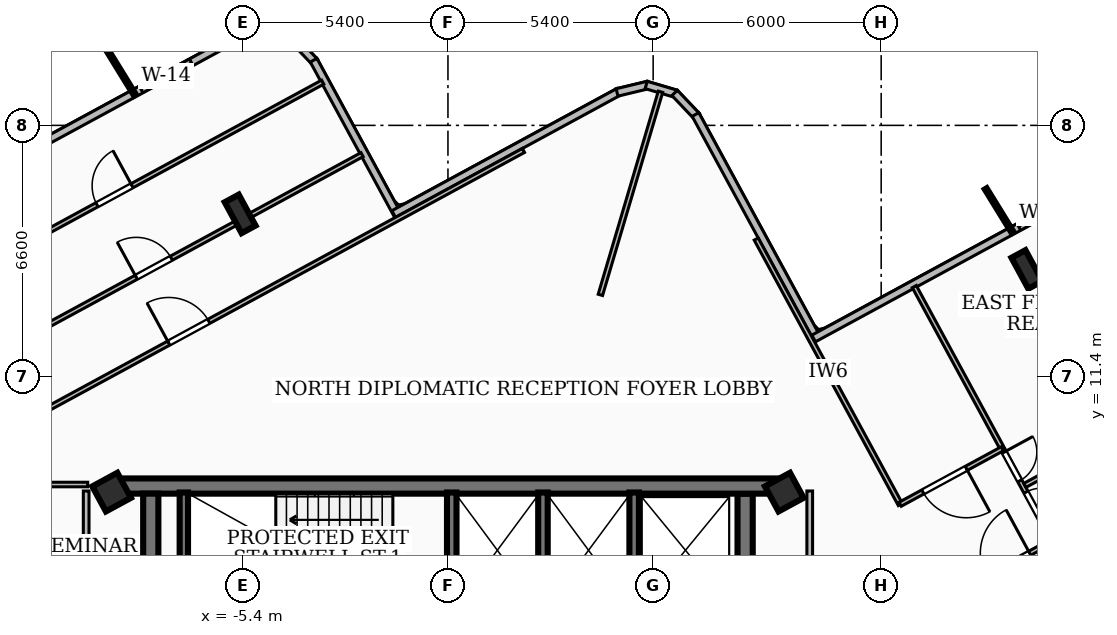
"""IFC4 building model, lengths in metres.
Left out: names, types, materials, properties, quantities, classifications, styles, units other than length and angle.
Written with IfcOpenShell. Run it as: python <this file> out.ifc"""

import sys

from ifc_helpers import new_model, si_unit, direction, frame, frame_2d, origin, origin_2d, place, context, subcontext, project, spatial, rectangle, i_section, extrude, element, fill, save


model = new_model("IFC4")
c1 = context("Model", 3, precision=1e-05, world=origin(), true_north=direction((0.0, 1.0)))
c2 = subcontext(c1, "Body", "Model", "MODEL_VIEW")
j1 = project(units=[si_unit("LENGTHUNIT", "METRE"), si_unit("PLANEANGLEUNIT", "RADIAN")], contexts=[c1])
p1 = place(None, origin())
s1 = spatial("IfcSite", under=j1, at=p1, CompositionType="ELEMENT")
p2 = place(p1, origin())
s2 = spatial("IfcBuilding", under=s1, at=p2, CompositionType="ELEMENT")
p3 = place(p2, frame((0.0, 0.0, 200.88)))
s3 = spatial("IfcBuildingStorey", under=s2, at=p3, CompositionType="ELEMENT", Elevation=200.88)
p4 = place(p3, frame((-8.78, 8.51, 0.0), z_axis=(0.0, 0.0, 1.0), x_axis=(1.0, 0.0, 0.0)))
e1 = element("IfcWall", 1, at=p4, inside=s3, PredefinedType="SHEAR", context=c2, shape_type="SweptSolid", body=[
    extrude(rectangle(XDim=17.56, YDim=0.4, at=frame_2d((8.78, 0.0))), origin(), (0.0, 0.0, 1.0), 4.06),
])
for number, where, z_axis, x_axis in (
    (2, (-7.82, 1.95, 0.0), (0.0, 0.0, 1.0), (0.0, 1.0, 0.0)),
    (3, (7.82, 8.31, 0.0), (0.0, 0.0, 1.0), (0.0, -1.0, 0.0)),
):
    element("IfcWall", number, at=place(p3, frame(where, z_axis=z_axis, x_axis=x_axis)), inside=s3, PredefinedType="SHEAR", context=c2, shape_type="SweptSolid", body=[
        extrude(rectangle(XDim=6.36, YDim=0.4, at=frame_2d((3.18, 0.0))), origin(), (0.0, 0.0, 1.0), 4.06),
    ])
p5 = place(p3, frame((-6.95, 5.28, 0.0), z_axis=(0.0, 0.0, 1.0), x_axis=(0.0, 1.0, 0.0)))
e4 = element("IfcWall", 4, at=p5, inside=s3, PredefinedType="SOLIDWALL", context=c2, shape_type="SweptSolid", body=[
    extrude(rectangle(XDim=3.06, YDim=0.22, at=frame_2d((1.53, 0.0))), origin(), (0.0, 0.0, 1.0), 4.06),
])
for number, where, z_axis, x_axis in (
    (5, (0.1, 5.3, 0.0), (0.0, 0.0, 1.0), (0.0, 1.0, 0.0)),
    (6, (2.5, 5.3, 0.0), (0.0, 0.0, 1.0), (0.0, 1.0, 0.0)),
    (7, (4.9, 5.3, 0.0), (0.0, 0.0, 1.0), (0.0, 1.0, 0.0)),
):
    element("IfcWall", number, at=place(p3, frame(where, z_axis=z_axis, x_axis=x_axis)), inside=s3, PredefinedType="SOLIDWALL", context=c2, shape_type="SweptSolid", body=[
        extrude(rectangle(XDim=3.04, YDim=0.25, at=frame_2d((1.52, 0.0))), origin(), (0.0, 0.0, 1.0), 4.06),
    ])
for number, where, z_axis, x_axis in (
    (8, (-8.85, 8.35, 0.0), (0.0, 0.0, 1.0), (0.879, 0.477, 0.0)),
    (9, (8.85, 8.35, 0.0), (0.0, 0.0, 1.0), (0.879, 0.477, 0.0)),
):
    element("IfcColumn", number, at=place(p3, frame(where, z_axis=z_axis, x_axis=x_axis)), inside=s3, PredefinedType="COLUMN", context=c2, shape_type="SweptSolid", body=[
        extrude(rectangle(XDim=0.75, YDim=0.75, at=origin_2d()), origin(), (0.0, 0.0, 1.0), 4.32),
    ])
for number, where, z_axis, x_axis in (
    (10, (15.234, 14.209, 0.0), (0.0, 0.0, 1.0), (0.879, 0.477, 0.0)),
    (11, (-5.468, 15.671, 0.0), (0.0, 0.0, 1.0), (0.879, 0.477, 0.0)),
):
    element("IfcColumn", number, at=place(p3, frame(where, z_axis=z_axis, x_axis=x_axis)), inside=s3, PredefinedType="COLUMN", context=c2, shape_type="SweptSolid", body=[
        extrude(i_section(OverallWidth=0.418, OverallDepth=0.927, WebThickness=0.019, FlangeThickness=0.032, at=origin_2d()), origin(), (0.0, 0.0, 1.0), 4.32),
    ])
p6 = place(p3, frame((-14.011, 15.72, 0.0), z_axis=(0.0, 0.0, 1.0), x_axis=(0.878829422659, 0.477136087368, 0.0)))
e12 = element("IfcWall", 12, at=p6, inside=s3, PredefinedType="SOLIDWALL", context=c2, shape_type="SweptSolid", body=[
    extrude(rectangle(XDim=9.624, YDim=0.2, at=frame_2d((4.812, 0.0))), origin(), (0.0, 0.0, 1.0), 4.06),
])
p7 = place(p6, frame((6.757, 0.0, 0.85)))
e13 = element("IfcOpeningElement", 13, at=p7, cuts=e12, PredefinedType="OPENING", context=c2, shape_type="SweptSolid", body=[
    extrude(rectangle(XDim=1.5, YDim=1.5, at=frame_2d((0.75, 0.75))), frame((0.0, 0.11, 0.0), z_axis=(0.0, -1.0, 0.0), x_axis=(1.0, 0.0, 0.0)), (0.0, 0.0, 1.0), 0.22),
])
p8 = place(p3, frame((-4.083, 20.282, 0.0), z_axis=(0.0, 0.0, 1.0), x_axis=(0.688366566384, -0.725362992084, 0.0)))
e14 = element("IfcWall", 14, at=p8, inside=s3, PredefinedType="SOLIDWALL", context=c2, shape_type="SweptSolid", body=[
    extrude(rectangle(XDim=0.838, YDim=0.2, at=frame_2d((0.419, 0.0))), origin(), (0.0, 0.0, 1.0), 4.06),
])
p9 = place(p3, frame((-3.535, 19.714, 0.0), z_axis=(0.0, 0.0, 1.0), x_axis=(0.477170791431, -0.878810580162, 0.0)))
e15 = element("IfcWall", 15, at=p9, inside=s3, PredefinedType="SOLIDWALL", context=c2, shape_type="SweptSolid", body=[
    extrude(rectangle(XDim=4.642, YDim=0.2, at=frame_2d((2.321, 0.0))), origin(), (0.0, 0.0, 1.0), 4.06),
])
p10 = place(p3, frame((-1.428, 15.667, 0.0), z_axis=(0.0, 0.0, 1.0), x_axis=(0.878784004338, 0.477219733162, 0.0)))
e16 = element("IfcWall", 16, at=p10, inside=s3, PredefinedType="SOLIDWALL", context=c2, shape_type="SweptSolid", body=[
    extrude(rectangle(XDim=6.741, YDim=0.2, at=frame_2d((3.371, 0.0))), origin(), (0.0, 0.0, 1.0), 4.06),
])
p11 = place(p3, frame((4.45, 18.866, 0.0), z_axis=(0.0, 0.0, 1.0), x_axis=(0.972262900219, 0.233890685703, 0.0)))
e17 = element("IfcWall", 17, at=p11, inside=s3, PredefinedType="SOLIDWALL", context=c2, shape_type="SweptSolid", body=[
    extrude(rectangle(XDim=0.838, YDim=0.2, at=frame_2d((0.419, 0.0))), origin(), (0.0, 0.0, 1.0), 4.06),
])
p12 = place(p3, frame((5.217, 19.063, 0.0), z_axis=(0.0, 0.0, 1.0), x_axis=(0.958863850972, -0.283866368736, 0.0)))
e18 = element("IfcWall", 18, at=p12, inside=s3, PredefinedType="SOLIDWALL", context=c2, shape_type="SweptSolid", body=[
    extrude(rectangle(XDim=0.824, YDim=0.2, at=frame_2d((0.412, 0.0))), origin(), (0.0, 0.0, 1.0), 4.06),
])
p13 = place(p3, frame((5.966, 18.854, 0.0), z_axis=(0.0, 0.0, 1.0), x_axis=(0.688366566384, -0.725362992084, 0.0)))
e19 = element("IfcWall", 19, at=p13, inside=s3, PredefinedType="SOLIDWALL", context=c2, shape_type="SweptSolid", body=[
    extrude(rectangle(XDim=0.838, YDim=0.2, at=frame_2d((0.419, 0.0))), origin(), (0.0, 0.0, 1.0), 4.06),
])
p14 = place(p3, frame((6.514, 18.286, 0.0), z_axis=(0.0, 0.0, 1.0), x_axis=(0.477174172682, -0.878808744224, 0.0)))
e20 = element("IfcWall", 20, at=p14, inside=s3, PredefinedType="SOLIDWALL", context=c2, shape_type="SweptSolid", body=[
    extrude(rectangle(XDim=6.742, YDim=0.2, at=frame_2d((3.371, 0.0))), origin(), (0.0, 0.0, 1.0), 4.06),
])
p15 = place(p3, frame((9.623, 12.393, 0.0), z_axis=(0.0, 0.0, 1.0), x_axis=(0.878806785067, 0.477177780832, 0.0)))
e21 = element("IfcWall", 21, at=p15, inside=s3, PredefinedType="SOLIDWALL", context=c2, shape_type="SweptSolid", body=[
    extrude(rectangle(XDim=8.842, YDim=0.2, at=frame_2d((4.421, 0.0))), origin(), (0.0, 0.0, 1.0), 4.06),
])
p16 = place(p15, frame((6.146, 0.0, 0.85)))
e22 = element("IfcOpeningElement", 22, at=p16, cuts=e21, PredefinedType="OPENING", context=c2, shape_type="SweptSolid", body=[
    extrude(rectangle(XDim=1.5, YDim=1.5, at=frame_2d((0.75, 0.75))), frame((0.0, 0.11, 0.0), z_axis=(0.0, -1.0, 0.0), x_axis=(1.0, 0.0, 0.0)), (0.0, 0.0, 1.0), 0.22),
])
p17 = place(p3, frame((-9.52, 1.75, 0.0), z_axis=(0.0, 0.0, 1.0), x_axis=(0.0, 1.0, 0.0)))
e23 = element("IfcWall", 23, at=p17, inside=s3, PredefinedType="PARTITIONING", context=c2, shape_type="SweptSolid", body=[
    extrude(rectangle(XDim=6.63, YDim=0.15, at=frame_2d((3.315, 0.0))), origin(), (0.0, 0.0, 1.0), 4.06),
])
p18 = place(p3, frame((9.52, 1.75, 0.0), z_axis=(0.0, 0.0, 1.0), x_axis=(0.0, 1.0, 0.0)))
e24 = element("IfcWall", 24, at=p18, inside=s3, PredefinedType="PARTITIONING", context=c2, shape_type="SweptSolid", body=[
    extrude(rectangle(XDim=6.63, YDim=0.15, at=frame_2d((3.315, 0.0))), origin(), (0.0, 0.0, 1.0), 3.43),
])
p19 = place(p3, frame((-14.4, 8.55, 0.0), z_axis=(0.0, 0.0, 1.0), x_axis=(1.0, 0.0, 0.0)))
e25 = element("IfcWall", 25, at=p19, inside=s3, PredefinedType="PARTITIONING", context=c2, shape_type="SweptSolid", body=[
    extrude(rectangle(XDim=4.92, YDim=0.12, at=frame_2d((2.46, 0.0))), origin(), (0.0, 0.0, 1.0), 3.43),
])
p20 = place(p3, frame((4.011, 13.54, 0.0), z_axis=(0.0, 0.0, 1.0), x_axis=(0.283861614282, 0.958865258489, 0.0)))
e26 = element("IfcWall", 26, at=p20, inside=s3, PredefinedType="PARTITIONING", context=c2, shape_type="SweptSolid", body=[
    extrude(rectangle(XDim=5.573, YDim=0.12, at=frame_2d((2.787, 0.0))), origin(), (0.0, 0.0, 1.0), 4.06),
])
p21 = place(p3, frame((11.905, 8.023, 0.0), z_axis=(0.0, 0.0, 1.0), x_axis=(-0.477237565532, 0.878774320315, 0.0)))
e27 = element("IfcWall", 27, at=p21, inside=s3, PredefinedType="PARTITIONING", context=c2, shape_type="SweptSolid", body=[
    extrude(rectangle(XDim=7.95, YDim=0.12, at=frame_2d((3.975, 0.0))), origin(), (0.0, 0.0, 1.0), 3.43),
])
p22 = place(p3, frame((14.589, 9.491, 0.0), z_axis=(0.0, 0.0, 1.0), x_axis=(-0.878839093996, -0.477118273454, 0.0)))
e28 = element("IfcWall", 28, at=p22, inside=s3, PredefinedType="PARTITIONING", context=c2, shape_type="SweptSolid", body=[
    extrude(rectangle(XDim=3.06, YDim=0.12, at=frame_2d((1.53, 0.0))), origin(), (0.0, 0.0, 1.0), 3.43),
])
p23 = place(p22, frame((1.08, 0.0, 0.0)))
e29 = element("IfcOpeningElement", 29, at=p23, cuts=e28, PredefinedType="OPENING", context=c2, shape_type="SweptSolid", body=[
    extrude(rectangle(XDim=1.3, YDim=2.1, at=frame_2d((0.65, 1.05))), frame((0.0, 0.07, 0.0), z_axis=(0.0, -1.0, 0.0), x_axis=(1.0, 0.0, 0.0)), (0.0, 0.0, 1.0), 0.14),
])
p24 = place(p3, frame((13.217, 5.606, 0.0), z_axis=(0.0, 0.0, 1.0), x_axis=(0.87882092953, 0.477151730397, 0.0)))
e30 = element("IfcWall", 30, at=p24, inside=s3, PredefinedType="PARTITIONING", context=c2, shape_type="SweptSolid", body=[
    extrude(rectangle(XDim=3.06, YDim=0.12, at=frame_2d((1.53, 0.0))), origin(), (0.0, 0.0, 1.0), 4.06),
])
p25 = place(p24, frame((1.08, 0.0, 0.0)))
e31 = element("IfcOpeningElement", 31, at=p25, cuts=e30, PredefinedType="OPENING", context=c2, shape_type="SweptSolid", body=[
    extrude(rectangle(XDim=1.3, YDim=2.1, at=frame_2d((0.65, 1.05))), frame((0.0, 0.07, 0.0), z_axis=(0.0, -1.0, 0.0), x_axis=(1.0, 0.0, 0.0)), (0.0, 0.0, 1.0), 0.14),
])
p26 = place(p3, frame((15.181, 8.527, 0.0), z_axis=(0.0, 0.0, 1.0), x_axis=(0.878776100726, 0.477234287109, 0.0)))
e32 = element("IfcWall", 32, at=p26, inside=s3, PredefinedType="PARTITIONING", context=c2, shape_type="SweptSolid", body=[
    extrude(rectangle(XDim=7.225, YDim=0.12, at=frame_2d((3.612, 0.0))), origin(), (0.0, 0.0, 1.0), 3.43),
])
p27 = place(p3, frame((12.272, 13.758, 0.0), z_axis=(0.0, 0.0, 1.0), x_axis=(0.477201164774, -0.878794087564, 0.0)))
e33 = element("IfcWall", 33, at=p27, inside=s3, PredefinedType="PARTITIONING", context=c2, shape_type="SweptSolid", body=[
    extrude(rectangle(XDim=12.47, YDim=0.12, at=frame_2d((6.235, 0.0))), origin(), (0.0, 0.0, 1.0), 3.43),
])
p28 = place(p27, frame((6.155, 0.0, 0.0)))
e34 = element("IfcOpeningElement", 34, at=p28, cuts=e33, PredefinedType="OPENING", context=c2, shape_type="SweptSolid", body=[
    extrude(rectangle(XDim=0.86, YDim=2.04, at=frame_2d((0.43, 1.02))), frame((0.0, 0.07, 0.0), z_axis=(0.0, -1.0, 0.0), x_axis=(1.0, 0.0, 0.0)), (0.0, 0.0, 1.0), 0.14),
])
p29 = place(p27, frame((4.955, 0.0, 0.0)))
e35 = element("IfcOpeningElement", 35, at=p29, cuts=e33, PredefinedType="OPENING", context=c2, shape_type="SweptSolid", body=[
    extrude(rectangle(XDim=0.86, YDim=2.04, at=frame_2d((0.43, 1.02))), frame((0.0, 0.07, 0.0), z_axis=(0.0, -1.0, 0.0), x_axis=(1.0, 0.0, 0.0)), (0.0, 0.0, 1.0), 0.14),
])
p30 = place(p3, frame((-15.624, 7.777, 0.0), z_axis=(0.0, 0.0, 1.0), x_axis=(0.878797236248, 0.477195366242, 0.0)))
e36 = element("IfcWall", 36, at=p30, inside=s3, PredefinedType="PARTITIONING", context=c2, shape_type="SweptSolid", body=[
    extrude(rectangle(XDim=20.04, YDim=0.12, at=frame_2d((10.02, 0.0))), origin(), (0.0, 0.0, 1.0), 3.43),
])
p31 = place(p30, frame((9.419, 0.0, 0.0)))
e37 = element("IfcOpeningElement", 37, at=p31, cuts=e36, PredefinedType="OPENING", context=c2, shape_type="SweptSolid", body=[
    extrude(rectangle(XDim=1.2, YDim=2.1, at=frame_2d((0.6, 1.05))), frame((0.0, 0.07, 0.0), z_axis=(0.0, -1.0, 0.0), x_axis=(1.0, 0.0, 0.0)), (0.0, 0.0, 1.0), 0.14),
])
p32 = place(p3, frame((-13.219, 11.279, 0.0), z_axis=(0.0, 0.0, 1.0), x_axis=(0.878794087564, 0.477201164774, 0.0)))
e38 = element("IfcWall", 38, at=p32, inside=s3, PredefinedType="PARTITIONING", context=c2, shape_type="SweptSolid", body=[
    extrude(rectangle(XDim=12.47, YDim=0.12, at=frame_2d((6.235, 0.0))), origin(), (0.0, 0.0, 1.0), 3.43),
])
p33 = place(p32, frame((5.709, 0.0, 0.0)))
e39 = element("IfcOpeningElement", 39, at=p33, cuts=e38, PredefinedType="OPENING", context=c2, shape_type="SweptSolid", body=[
    extrude(rectangle(XDim=1.05, YDim=2.08, at=frame_2d((0.525, 1.04))), frame((0.0, 0.07, 0.0), z_axis=(0.0, -1.0, 0.0), x_axis=(1.0, 0.0, 0.0)), (0.0, 0.0, 1.0), 0.14),
])
p34 = place(p3, frame((-14.254, 13.186, 0.0), z_axis=(0.0, 0.0, 1.0), x_axis=(0.878776252911, 0.477234006878, 0.0)))
e40 = element("IfcWall", 40, at=p34, inside=s3, PredefinedType="PARTITIONING", context=c2, shape_type="SweptSolid", body=[
    extrude(rectangle(XDim=12.47, YDim=0.12, at=frame_2d((6.235, 0.0))), origin(), (0.0, 0.0, 1.0), 4.06),
])
p35 = place(p34, frame((5.71, 0.0, 0.0)))
e41 = element("IfcOpeningElement", 41, at=p35, cuts=e40, PredefinedType="OPENING", context=c2, shape_type="SweptSolid", body=[
    extrude(rectangle(XDim=1.05, YDim=2.08, at=frame_2d((0.525, 1.04))), frame((0.0, 0.07, 0.0), z_axis=(0.0, -1.0, 0.0), x_axis=(1.0, 0.0, 0.0)), (0.0, 0.0, 1.0), 0.14),
])
p36 = place(p7, origin())
e42 = element("IfcWindow", 42, at=p36, inside=s3, PartitioningType="SINGLE_PANEL", PredefinedType="WINDOW", context=c2, shape_type="SweptSolid", body=[
    extrude(rectangle(XDim=1.5, YDim=1.5, at=frame_2d((0.75, 0.75))), frame((0.0, 0.03, 0.0), z_axis=(0.0, -1.0, 0.0), x_axis=(1.0, 0.0, 0.0)), (0.0, 0.0, 1.0), 0.06),
])
fill(e13, e42)
p37 = place(p16, origin())
e43 = element("IfcWindow", 43, at=p37, inside=s3, PartitioningType="SINGLE_PANEL", PredefinedType="WINDOW", context=c2, shape_type="SweptSolid", body=[
    extrude(rectangle(XDim=1.5, YDim=1.5, at=frame_2d((0.75, 0.75))), frame((0.0, 0.03, 0.0), z_axis=(0.0, -1.0, 0.0), x_axis=(1.0, 0.0, 0.0)), (0.0, 0.0, 1.0), 0.06),
])
fill(e22, e43)
p38 = place(p23, origin())
e44 = element("IfcDoor", 44, at=p38, inside=s3, OperationType="SINGLE_SWING_LEFT", PredefinedType="DOOR", context=c2, shape_type="SweptSolid", body=[
    extrude(rectangle(XDim=1.3, YDim=2.1, at=frame_2d((0.65, 1.05))), frame((0.0, 0.025, 0.0), z_axis=(0.0, -1.0, 0.0), x_axis=(1.0, 0.0, 0.0)), (0.0, 0.0, 1.0), 0.05),
])
fill(e29, e44)
p39 = place(p25, origin())
e45 = element("IfcDoor", 45, at=p39, inside=s3, OperationType="SINGLE_SWING_RIGHT", PredefinedType="DOOR", context=c2, shape_type="SweptSolid", body=[
    extrude(rectangle(XDim=1.3, YDim=2.1, at=frame_2d((0.65, 1.05))), frame((0.0, 0.025, 0.0), z_axis=(0.0, -1.0, 0.0), x_axis=(1.0, 0.0, 0.0)), (0.0, 0.0, 1.0), 0.05),
])
fill(e31, e45)
p40 = place(p28, origin())
e46 = element("IfcDoor", 46, at=p40, inside=s3, OperationType="SINGLE_SWING_RIGHT", PredefinedType="DOOR", context=c2, shape_type="SweptSolid", body=[
    extrude(rectangle(XDim=0.86, YDim=2.04, at=frame_2d((0.43, 1.02))), frame((0.0, 0.025, 0.0), z_axis=(0.0, -1.0, 0.0), x_axis=(1.0, 0.0, 0.0)), (0.0, 0.0, 1.0), 0.05),
])
fill(e34, e46)
p41 = place(p29, origin())
e47 = element("IfcDoor", 47, at=p41, inside=s3, OperationType="SINGLE_SWING_LEFT", PredefinedType="DOOR", context=c2, shape_type="SweptSolid", body=[
    extrude(rectangle(XDim=0.86, YDim=2.04, at=frame_2d((0.43, 1.02))), frame((0.0, 0.025, 0.0), z_axis=(0.0, -1.0, 0.0), x_axis=(1.0, 0.0, 0.0)), (0.0, 0.0, 1.0), 0.05),
])
fill(e35, e47)
p42 = place(p31, origin())
e48 = element("IfcDoor", 48, at=p42, inside=s3, OperationType="SINGLE_SWING_LEFT", PredefinedType="DOOR", context=c2, shape_type="SweptSolid", body=[
    extrude(rectangle(XDim=1.2, YDim=2.1, at=frame_2d((0.6, 1.05))), frame((0.0, 0.025, 0.0), z_axis=(0.0, -1.0, 0.0), x_axis=(1.0, 0.0, 0.0)), (0.0, 0.0, 1.0), 0.05),
])
fill(e37, e48)
p43 = place(p33, origin())
e49 = element("IfcDoor", 49, at=p43, inside=s3, OperationType="SINGLE_SWING_LEFT", PredefinedType="DOOR", context=c2, shape_type="SweptSolid", body=[
    extrude(rectangle(XDim=1.05, YDim=2.08, at=frame_2d((0.525, 1.04))), frame((0.0, 0.025, 0.0), z_axis=(0.0, -1.0, 0.0), x_axis=(1.0, 0.0, 0.0)), (0.0, 0.0, 1.0), 0.05),
])
fill(e39, e49)
p44 = place(p35, origin())
e50 = element("IfcDoor", 50, at=p44, inside=s3, OperationType="SINGLE_SWING_RIGHT", PredefinedType="DOOR", context=c2, shape_type="SweptSolid", body=[
    extrude(rectangle(XDim=1.05, YDim=2.08, at=frame_2d((0.525, 1.04))), frame((0.0, 0.025, 0.0), z_axis=(0.0, -1.0, 0.0), x_axis=(1.0, 0.0, 0.0)), (0.0, 0.0, 1.0), 0.05),
])
fill(e41, e50)
save(model, sys.argv[1])
